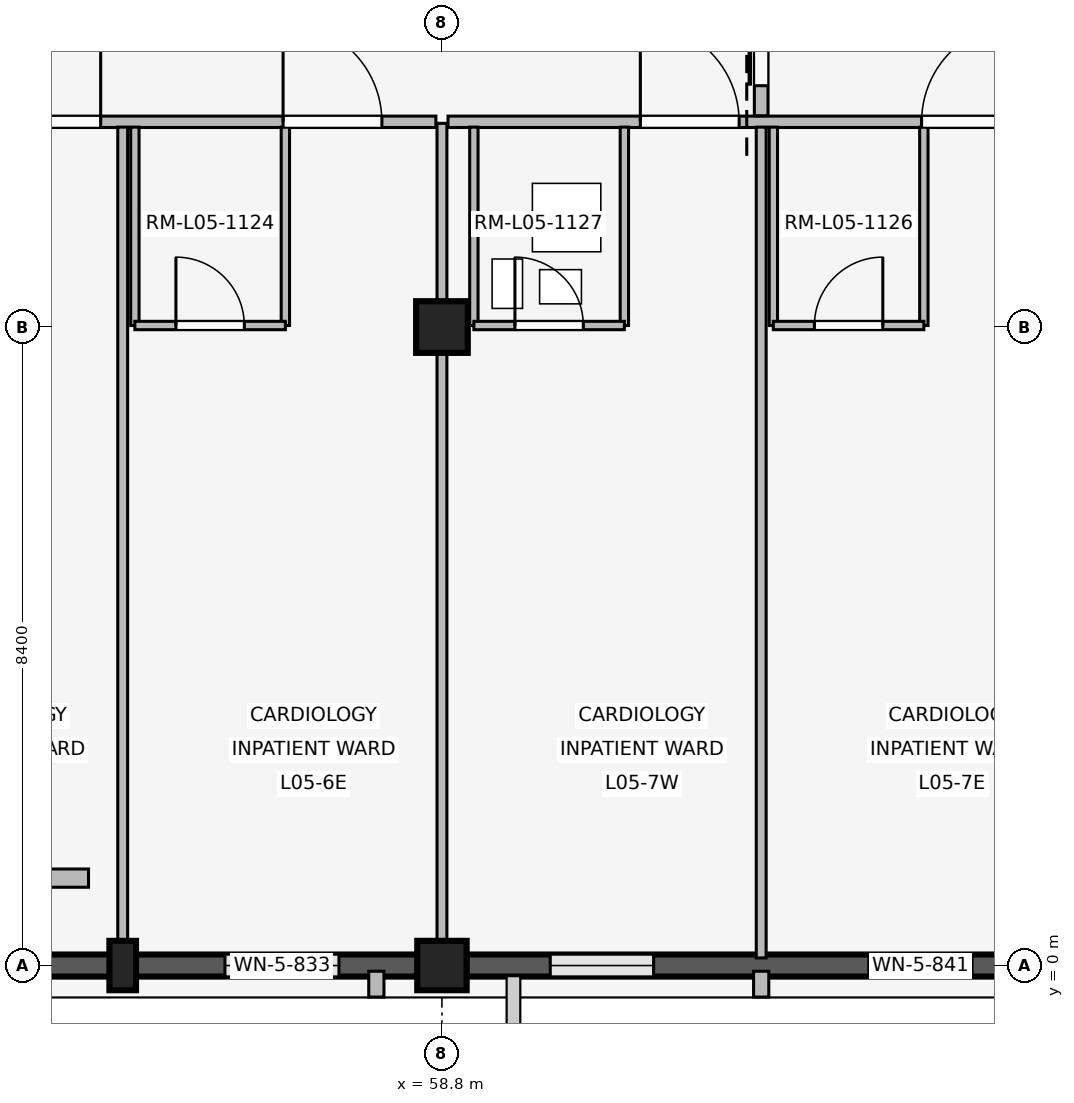
"""IFC4 building model, lengths in metres.
Left out: names, types, materials, properties, quantities, classifications, styles, units other than length and angle.
Written with IfcOpenShell. Run it as: python <this file> out.ifc"""

import sys

from ifc_helpers import new_model, si_unit, direction, frame, frame_2d, origin, origin_2d, place, context, subcontext, project, spatial, rectangle, extrude, element, fill, save


model = new_model("IFC4")
c1 = context("Model", 3, precision=1e-05, world=origin(), true_north=direction((0.0, 1.0)))
c2 = subcontext(c1, "Body", "Model", "MODEL_VIEW")
j1 = project(units=[si_unit("LENGTHUNIT", "METRE"), si_unit("PLANEANGLEUNIT", "RADIAN")], contexts=[c1])
p1 = place(None, origin())
s1 = spatial("IfcSite", under=j1, at=p1, CompositionType="ELEMENT")
p2 = place(p1, origin())
s2 = spatial("IfcBuilding", under=s1, at=p2, CompositionType="ELEMENT")
p3 = place(p2, frame((0.0, 0.0, 20.4)))
s3 = spatial("IfcBuildingStorey", under=s2, at=p3, CompositionType="ELEMENT", Elevation=20.4)
p4 = place(p3, frame((58.8, 0.0, 0.0), z_axis=(0.0, 0.0, 1.0), x_axis=(1.0, 0.0, 0.0)))
e1 = element("IfcColumn", 1, at=p4, inside=s3, PredefinedType="COLUMN", context=c2, shape_type="SweptSolid", body=[
    extrude(rectangle(XDim=0.65, YDim=0.65, at=origin_2d()), origin(), (0.0, 0.0, 1.0), 4.2),
])
p5 = place(p3, frame((58.8, 8.4, 0.0), z_axis=(0.0, 0.0, 1.0), x_axis=(1.0, 0.0, 0.0)))
e2 = element("IfcColumn", 2, at=p5, inside=s3, PredefinedType="COLUMN", context=c2, shape_type="SweptSolid", body=[
    extrude(rectangle(XDim=0.68, YDim=0.68, at=origin_2d()), origin(), (0.0, 0.0, 1.0), 4.2),
])
p6 = place(p3, frame((54.6, 0.0, 0.0), z_axis=(0.0, 0.0, 1.0), x_axis=(1.0, 0.0, 0.0)))
e3 = element("IfcColumn", 3, at=p6, inside=s3, PredefinedType="PILASTER", context=c2, shape_type="SweptSolid", body=[
    extrude(rectangle(XDim=0.35, YDim=0.65, at=origin_2d()), origin(), (0.0, 0.0, 1.0), 4.2),
])
p7 = place(p3, frame((58.48, 0.0, 0.0), z_axis=(0.0, 0.0, 1.0), x_axis=(-1.0, 0.0, 0.0)))
e4 = element("IfcWall", 4, at=p7, inside=s3, PredefinedType="SOLIDWALL", context=c2, shape_type="SweptSolid", body=[
    extrude(rectangle(XDim=7.76, YDim=0.29, at=frame_2d((3.88, 0.0))), origin(), (0.0, 0.0, 1.0), 3.34),
])
p8 = place(p7, frame((1.035, 0.0, 0.85)))
e5 = element("IfcOpeningElement", 5, at=p8, cuts=e4, PredefinedType="OPENING", context=c2, shape_type="SweptSolid", body=[
    extrude(rectangle(XDim=1.5, YDim=1.55, at=frame_2d((0.75, 0.775))), frame((0.0, 0.155, 0.0), z_axis=(0.0, -1.0, 0.0), x_axis=(1.0, 0.0, 0.0)), (0.0, 0.0, 1.0), 0.31),
])
p9 = place(p7, frame((5.225, 0.0, 0.85)))
e6 = element("IfcOpeningElement", 6, at=p9, cuts=e4, PredefinedType="OPENING", context=c2, shape_type="SweptSolid", body=[
    extrude(rectangle(XDim=1.5, YDim=1.55, at=frame_2d((0.75, 0.775))), frame((0.0, 0.155, 0.0), z_axis=(0.0, -1.0, 0.0), x_axis=(1.0, 0.0, 0.0)), (0.0, 0.0, 1.0), 0.31),
])
p10 = place(p3, frame((57.937, -0.075, 0.0), z_axis=(0.0, 0.0, 1.0), x_axis=(0.0, -1.0, 0.0)))
e7 = element("IfcWall", 7, at=p10, inside=s3, PredefinedType="ELEMENTEDWALL", context=c2, shape_type="SweptSolid", body=[
    extrude(rectangle(XDim=0.34, YDim=0.2, at=frame_2d((0.17, 0.0))), origin(), (0.0, 0.0, 1.0), 3.32),
])
p11 = place(p3, frame((66.88, 0.0, 0.0), z_axis=(0.0, 0.0, 1.0), x_axis=(-1.0, 0.0, 0.0)))
e8 = element("IfcWall", 8, at=p11, inside=s3, PredefinedType="SOLIDWALL", context=c2, shape_type="SweptSolid", body=[
    extrude(rectangle(XDim=7.76, YDim=0.29, at=frame_2d((3.88, 0.0))), origin(), (0.0, 0.0, 1.0), 3.34),
])
p12 = place(p11, frame((1.105, 0.0, 0.85)))
e9 = element("IfcOpeningElement", 9, at=p12, cuts=e8, PredefinedType="OPENING", context=c2, shape_type="SweptSolid", body=[
    extrude(rectangle(XDim=1.36, YDim=1.42, at=frame_2d((0.68, 0.71))), frame((0.0, 0.155, 0.0), z_axis=(0.0, -1.0, 0.0), x_axis=(1.0, 0.0, 0.0)), (0.0, 0.0, 1.0), 0.31),
])
p13 = place(p11, frame((5.295, 0.0, 0.85)))
e10 = element("IfcOpeningElement", 10, at=p13, cuts=e8, PredefinedType="OPENING", context=c2, shape_type="SweptSolid", body=[
    extrude(rectangle(XDim=1.36, YDim=1.42, at=frame_2d((0.68, 0.71))), frame((0.0, 0.155, 0.0), z_axis=(0.0, -1.0, 0.0), x_axis=(1.0, 0.0, 0.0)), (0.0, 0.0, 1.0), 0.31),
])
p14 = place(p3, frame((63.0, -0.075, 0.0), z_axis=(0.0, 0.0, 1.0), x_axis=(0.0, -1.0, 0.0)))
e11 = element("IfcWall", 11, at=p14, inside=s3, PredefinedType="ELEMENTEDWALL", context=c2, shape_type="SweptSolid", body=[
    extrude(rectangle(XDim=0.34, YDim=0.2, at=frame_2d((0.17, 0.0))), origin(), (0.0, 0.0, 1.0), 3.32),
])
p15 = place(p3, frame((50.76, 11.1, 0.0), z_axis=(0.0, 0.0, 1.0), x_axis=(1.0, 0.0, 0.0)))
e12 = element("IfcWall", 12, at=p15, inside=s3, PredefinedType="PARTITIONING", context=c2, shape_type="SweptSolid", body=[
    extrude(rectangle(XDim=7.96, YDim=0.15, at=frame_2d((3.98, 0.0))), origin(), (0.0, 0.0, 1.0), 3.32),
])
p16 = place(p15, frame((2.25, 0.0, 0.0)))
e13 = element("IfcOpeningElement", 13, at=p16, cuts=e12, PredefinedType="OPENING", context=c2, shape_type="SweptSolid", body=[
    extrude(rectangle(XDim=1.3, YDim=2.25, at=frame_2d((0.65, 1.125))), frame((0.0, 0.085, 0.0), z_axis=(0.0, -1.0, 0.0), x_axis=(1.0, 0.0, 0.0)), (0.0, 0.0, 1.0), 0.17),
])
p17 = place(p15, frame((5.95, 0.0, 0.0)))
e14 = element("IfcOpeningElement", 14, at=p17, cuts=e12, PredefinedType="OPENING", context=c2, shape_type="SweptSolid", body=[
    extrude(rectangle(XDim=1.3, YDim=2.25, at=frame_2d((0.65, 1.125))), frame((0.0, 0.085, 0.0), z_axis=(0.0, -1.0, 0.0), x_axis=(1.0, 0.0, 0.0)), (0.0, 0.0, 1.0), 0.17),
])
p18 = place(p3, frame((54.6, 0.1, 0.0), z_axis=(0.0, 0.0, 1.0), x_axis=(0.0, 1.0, 0.0)))
e15 = element("IfcWall", 15, at=p18, inside=s3, PredefinedType="PARTITIONING", context=c2, shape_type="SweptSolid", body=[
    extrude(rectangle(XDim=10.93, YDim=0.13, at=frame_2d((5.465, 0.0))), origin(), (0.0, 0.0, 1.0), 3.32),
])
for number, where, z_axis, x_axis in (
    (16, (54.76, 8.42, 0.0), (0.0, 0.0, 1.0), (0.0, 1.0, 0.0)),
    (17, (56.74, 8.42, 0.0), (0.0, 0.0, 1.0), (0.0, 1.0, 0.0)),
):
    element("IfcWall", number, at=place(p3, frame(where, z_axis=z_axis, x_axis=x_axis)), inside=s3, PredefinedType="PARTITIONING", context=c2, shape_type="SweptSolid", body=[
        extrude(rectangle(XDim=2.61, YDim=0.11, at=frame_2d((1.305, 0.0))), origin(), (0.0, 0.0, 1.0), 3.32),
    ])
p19 = place(p3, frame((54.76, 8.42, 0.0), z_axis=(0.0, 0.0, 1.0), x_axis=(1.0, 0.0, 0.0)))
e18 = element("IfcWall", 18, at=p19, inside=s3, PredefinedType="PARTITIONING", context=c2, shape_type="SweptSolid", body=[
    extrude(rectangle(XDim=1.98, YDim=0.11, at=frame_2d((0.99, 0.0))), origin(), (0.0, 0.0, 1.0), 3.32),
])
p20 = place(p19, frame((0.54, 0.0, 0.0)))
e19 = element("IfcOpeningElement", 19, at=p20, cuts=e18, PredefinedType="OPENING", context=c2, shape_type="SweptSolid", body=[
    extrude(rectangle(XDim=0.9, YDim=2.1, at=frame_2d((0.45, 1.05))), frame((0.0, 0.065, 0.0), z_axis=(0.0, -1.0, 0.0), x_axis=(1.0, 0.0, 0.0)), (0.0, 0.0, 1.0), 0.13),
])
p21 = place(p3, frame((53.25, 1.15, 0.0), z_axis=(0.0, 0.0, 1.0), x_axis=(1.0, 0.0, 0.0)))
e20 = element("IfcWall", 20, at=p21, inside=s3, PredefinedType="PLUMBINGWALL", context=c2, shape_type="SweptSolid", body=[
    extrude(rectangle(XDim=0.9, YDim=0.24, at=frame_2d((0.45, 0.0))), origin(), (0.0, 0.0, 1.0), 3.32),
])
p22 = place(p3, frame((58.8, 0.14, 0.0), z_axis=(0.0, 0.0, 1.0), x_axis=(0.0, 1.0, 0.0)))
e21 = element("IfcWall", 21, at=p22, inside=s3, PredefinedType="PARTITIONING", context=c2, shape_type="SweptSolid", body=[
    extrude(rectangle(XDim=10.94, YDim=0.13, at=frame_2d((5.47, 0.0))), origin(), (0.0, 0.0, 1.0), 3.32),
])
p23 = place(p3, frame((58.88, 11.1, 0.0), z_axis=(0.0, 0.0, 1.0), x_axis=(1.0, 0.0, 0.0)))
e22 = element("IfcWall", 22, at=p23, inside=s3, PredefinedType="PARTITIONING", context=c2, shape_type="SweptSolid", body=[
    extrude(rectangle(XDim=8.24, YDim=0.15, at=frame_2d((4.12, 0.0))), origin(), (0.0, 0.0, 1.0), 3.32),
])
p24 = place(p23, frame((2.53, 0.0, 0.0)))
e23 = element("IfcOpeningElement", 23, at=p24, cuts=e22, PredefinedType="OPENING", context=c2, shape_type="SweptSolid", body=[
    extrude(rectangle(XDim=1.3, YDim=2.25, at=frame_2d((0.65, 1.125))), frame((0.0, 0.085, 0.0), z_axis=(0.0, -1.0, 0.0), x_axis=(1.0, 0.0, 0.0)), (0.0, 0.0, 1.0), 0.17),
])
p25 = place(p23, frame((6.23, 0.0, 0.0)))
e24 = element("IfcOpeningElement", 24, at=p25, cuts=e22, PredefinedType="OPENING", context=c2, shape_type="SweptSolid", body=[
    extrude(rectangle(XDim=1.3, YDim=2.25, at=frame_2d((0.65, 1.125))), frame((0.0, 0.085, 0.0), z_axis=(0.0, -1.0, 0.0), x_axis=(1.0, 0.0, 0.0)), (0.0, 0.0, 1.0), 0.17),
])
p26 = place(p3, frame((63.0, 0.1, 0.0), z_axis=(0.0, 0.0, 1.0), x_axis=(0.0, 1.0, 0.0)))
e25 = element("IfcWall", 25, at=p26, inside=s3, PredefinedType="PARTITIONING", context=c2, shape_type="SweptSolid", body=[
    extrude(rectangle(XDim=10.93, YDim=0.13, at=frame_2d((5.465, 0.0))), origin(), (0.0, 0.0, 1.0), 3.32),
])
for number, where, z_axis, x_axis in (
    (26, (59.22, 8.42, 0.0), (0.0, 0.0, 1.0), (0.0, 1.0, 0.0)),
    (27, (61.2, 8.42, 0.0), (0.0, 0.0, 1.0), (0.0, 1.0, 0.0)),
):
    element("IfcWall", number, at=place(p3, frame(where, z_axis=z_axis, x_axis=x_axis)), inside=s3, PredefinedType="PARTITIONING", context=c2, shape_type="SweptSolid", body=[
        extrude(rectangle(XDim=2.61, YDim=0.11, at=frame_2d((1.305, 0.0))), origin(), (0.0, 0.0, 1.0), 3.32),
    ])
p27 = place(p3, frame((59.22, 8.42, 0.0), z_axis=(0.0, 0.0, 1.0), x_axis=(1.0, 0.0, 0.0)))
e28 = element("IfcWall", 28, at=p27, inside=s3, PredefinedType="PARTITIONING", context=c2, shape_type="SweptSolid", body=[
    extrude(rectangle(XDim=1.98, YDim=0.11, at=frame_2d((0.99, 0.0))), origin(), (0.0, 0.0, 1.0), 3.32),
])
p28 = place(p27, frame((0.54, 0.0, 0.0)))
e29 = element("IfcOpeningElement", 29, at=p28, cuts=e28, PredefinedType="OPENING", context=c2, shape_type="SweptSolid", body=[
    extrude(rectangle(XDim=0.9, YDim=2.1, at=frame_2d((0.45, 1.05))), frame((0.0, 0.065, 0.0), z_axis=(0.0, -1.0, 0.0), x_axis=(1.0, 0.0, 0.0)), (0.0, 0.0, 1.0), 0.13),
])
for number, where, z_axis, x_axis in (
    (30, (63.16, 8.42, 0.0), (0.0, 0.0, 1.0), (0.0, 1.0, 0.0)),
    (31, (65.14, 8.42, 0.0), (0.0, 0.0, 1.0), (0.0, 1.0, 0.0)),
):
    element("IfcWall", number, at=place(p3, frame(where, z_axis=z_axis, x_axis=x_axis)), inside=s3, PredefinedType="PARTITIONING", context=c2, shape_type="SweptSolid", body=[
        extrude(rectangle(XDim=2.61, YDim=0.11, at=frame_2d((1.305, 0.0))), origin(), (0.0, 0.0, 1.0), 3.32),
    ])
p29 = place(p3, frame((63.16, 8.42, 0.0), z_axis=(0.0, 0.0, 1.0), x_axis=(1.0, 0.0, 0.0)))
e32 = element("IfcWall", 32, at=p29, inside=s3, PredefinedType="PARTITIONING", context=c2, shape_type="SweptSolid", body=[
    extrude(rectangle(XDim=1.98, YDim=0.11, at=frame_2d((0.99, 0.0))), origin(), (0.0, 0.0, 1.0), 3.32),
])
p30 = place(p29, frame((0.54, 0.0, 0.0)))
e33 = element("IfcOpeningElement", 33, at=p30, cuts=e32, PredefinedType="OPENING", context=c2, shape_type="SweptSolid", body=[
    extrude(rectangle(XDim=0.9, YDim=2.1, at=frame_2d((0.45, 1.05))), frame((0.0, 0.065, 0.0), z_axis=(0.0, -1.0, 0.0), x_axis=(1.0, 0.0, 0.0)), (0.0, 0.0, 1.0), 0.13),
])
p31 = place(p3, frame((63.0, 11.18, 0.0), z_axis=(0.0, 0.0, 1.0), x_axis=(0.0, 1.0, 0.0)))
e34 = element("IfcWall", 34, at=p31, inside=s3, PredefinedType="PARTITIONING", context=c2, shape_type="SweptSolid", body=[
    extrude(rectangle(XDim=2.84, YDim=0.18, at=frame_2d((1.42, 0.0))), origin(), (0.0, 0.0, 1.0), 3.32),
])
p32 = place(p31, frame((0.395, 0.0, 0.0)))
e35 = element("IfcOpeningElement", 35, at=p32, cuts=e34, PredefinedType="OPENING", context=c2, shape_type="SweptSolid", body=[
    extrude(rectangle(XDim=2.05, YDim=2.35, at=frame_2d((1.025, 1.175))), frame((0.0, 0.1, 0.0), z_axis=(0.0, -1.0, 0.0), x_axis=(1.0, 0.0, 0.0)), (0.0, 0.0, 1.0), 0.2),
])
p33 = place(p8, origin())
e36 = element("IfcWindow", 36, at=p33, inside=s3, PartitioningType="SINGLE_PANEL", PredefinedType="WINDOW", context=c2, shape_type="SweptSolid", body=[
    extrude(rectangle(XDim=1.5, YDim=1.55, at=frame_2d((0.75, 0.775))), frame((0.0, 0.03, 0.0), z_axis=(0.0, -1.0, 0.0), x_axis=(1.0, 0.0, 0.0)), (0.0, 0.0, 1.0), 0.06),
])
fill(e5, e36)
p34 = place(p12, origin())
e37 = element("IfcWindow", 37, at=p34, inside=s3, PartitioningType="SINGLE_PANEL", PredefinedType="WINDOW", context=c2, shape_type="SweptSolid", body=[
    extrude(rectangle(XDim=1.36, YDim=1.42, at=frame_2d((0.68, 0.71))), frame((0.0, 0.03, 0.0), z_axis=(0.0, -1.0, 0.0), x_axis=(1.0, 0.0, 0.0)), (0.0, 0.0, 1.0), 0.06),
])
fill(e9, e37)
p35 = place(p13, origin())
e38 = element("IfcWindow", 38, at=p35, inside=s3, PartitioningType="SINGLE_PANEL", PredefinedType="WINDOW", context=c2, shape_type="SweptSolid", body=[
    extrude(rectangle(XDim=1.36, YDim=1.42, at=frame_2d((0.68, 0.71))), frame((0.0, 0.03, 0.0), z_axis=(0.0, -1.0, 0.0), x_axis=(1.0, 0.0, 0.0)), (0.0, 0.0, 1.0), 0.06),
])
fill(e10, e38)
p36 = place(p16, origin())
e39 = element("IfcDoor", 39, at=p36, inside=s3, OperationType="SINGLE_SWING_RIGHT", PredefinedType="DOOR", context=c2, shape_type="SweptSolid", body=[
    extrude(rectangle(XDim=1.3, YDim=2.25, at=frame_2d((0.65, 1.125))), frame((0.0, 0.025, 0.0), z_axis=(0.0, -1.0, 0.0), x_axis=(1.0, 0.0, 0.0)), (0.0, 0.0, 1.0), 0.05),
])
fill(e13, e39)
p37 = place(p17, origin())
e40 = element("IfcDoor", 40, at=p37, inside=s3, OperationType="SINGLE_SWING_LEFT", PredefinedType="DOOR", context=c2, shape_type="SweptSolid", body=[
    extrude(rectangle(XDim=1.3, YDim=2.25, at=frame_2d((0.65, 1.125))), frame((0.0, 0.025, 0.0), z_axis=(0.0, -1.0, 0.0), x_axis=(1.0, 0.0, 0.0)), (0.0, 0.0, 1.0), 0.05),
])
fill(e14, e40)
p38 = place(p20, origin())
e41 = element("IfcDoor", 41, at=p38, inside=s3, OperationType="SINGLE_SWING_LEFT", PredefinedType="DOOR", context=c2, shape_type="SweptSolid", body=[
    extrude(rectangle(XDim=0.9, YDim=2.1, at=frame_2d((0.45, 1.05))), frame((0.0, 0.025, 0.0), z_axis=(0.0, -1.0, 0.0), x_axis=(1.0, 0.0, 0.0)), (0.0, 0.0, 1.0), 0.05),
])
fill(e19, e41)
p39 = place(p24, origin())
e42 = element("IfcDoor", 42, at=p39, inside=s3, OperationType="SINGLE_SWING_LEFT", PredefinedType="DOOR", context=c2, shape_type="SweptSolid", body=[
    extrude(rectangle(XDim=1.3, YDim=2.25, at=frame_2d((0.65, 1.125))), frame((0.0, 0.025, 0.0), z_axis=(0.0, -1.0, 0.0), x_axis=(1.0, 0.0, 0.0)), (0.0, 0.0, 1.0), 0.05),
])
fill(e23, e42)
p40 = place(p25, origin())
e43 = element("IfcDoor", 43, at=p40, inside=s3, OperationType="SINGLE_SWING_RIGHT", PredefinedType="DOOR", context=c2, shape_type="SweptSolid", body=[
    extrude(rectangle(XDim=1.3, YDim=2.25, at=frame_2d((0.65, 1.125))), frame((0.0, 0.025, 0.0), z_axis=(0.0, -1.0, 0.0), x_axis=(1.0, 0.0, 0.0)), (0.0, 0.0, 1.0), 0.05),
])
fill(e24, e43)
p41 = place(p28, origin())
e44 = element("IfcDoor", 44, at=p41, inside=s3, OperationType="SINGLE_SWING_LEFT", PredefinedType="DOOR", context=c2, shape_type="SweptSolid", body=[
    extrude(rectangle(XDim=0.9, YDim=2.1, at=frame_2d((0.45, 1.05))), frame((0.0, 0.025, 0.0), z_axis=(0.0, -1.0, 0.0), x_axis=(1.0, 0.0, 0.0)), (0.0, 0.0, 1.0), 0.05),
])
fill(e29, e44)
p42 = place(p30, origin())
e45 = element("IfcDoor", 45, at=p42, inside=s3, OperationType="SINGLE_SWING_RIGHT", PredefinedType="DOOR", context=c2, shape_type="SweptSolid", body=[
    extrude(rectangle(XDim=0.9, YDim=2.1, at=frame_2d((0.45, 1.05))), frame((0.0, 0.025, 0.0), z_axis=(0.0, -1.0, 0.0), x_axis=(1.0, 0.0, 0.0)), (0.0, 0.0, 1.0), 0.05),
])
fill(e33, e45)
p43 = place(p32, origin())
e46 = element("IfcDoor", 46, at=p43, inside=s3, OperationType="SLIDING_TO_LEFT", PredefinedType="DOOR", context=c2, shape_type="SweptSolid", body=[
    extrude(rectangle(XDim=2.05, YDim=2.35, at=frame_2d((1.025, 1.175))), frame((0.0, 0.025, 0.0), z_axis=(0.0, -1.0, 0.0), x_axis=(1.0, 0.0, 0.0)), (0.0, 0.0, 1.0), 0.05),
])
fill(e35, e46)
save(model, sys.argv[1])
